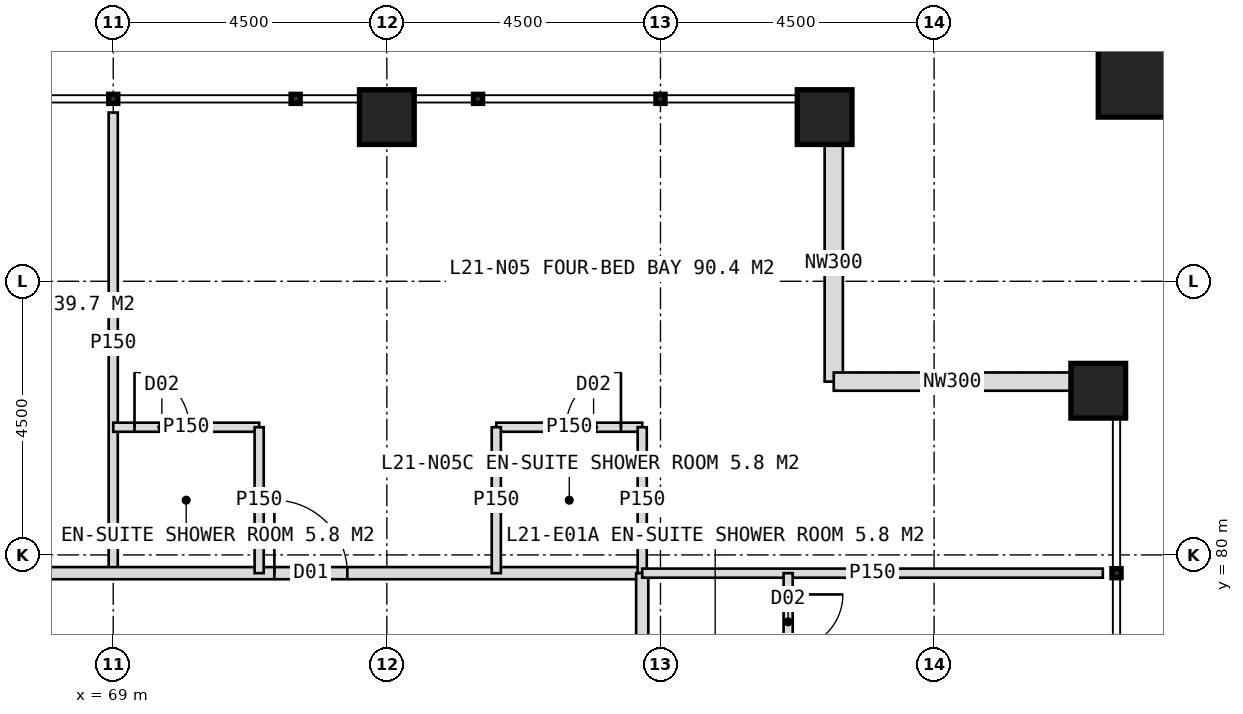
"""IFC4 building model, lengths in metres.
Left out: names, types, materials, properties, quantities, classifications, styles, units other than length and angle.
Written with IfcOpenShell. Run it as: python <this file> out.ifc"""

import sys

from ifc_helpers import new_model, si_unit, direction, frame, frame_2d, origin, origin_2d, place, context, subcontext, project, spatial, rectangle, hollow_rectangle, extrude, element, fill, save


model = new_model("IFC4")
c1 = context("Model", 3, precision=1e-05, world=origin(), true_north=direction((0.0, 1.0)))
c2 = subcontext(c1, "Body", "Model", "MODEL_VIEW")
j1 = project(units=[si_unit("LENGTHUNIT", "METRE"), si_unit("PLANEANGLEUNIT", "RADIAN")], contexts=[c1])
p1 = place(None, origin())
s1 = spatial("IfcSite", under=j1, at=p1, CompositionType="ELEMENT")
p2 = place(p1, origin())
s2 = spatial("IfcBuilding", under=s1, at=p2, CompositionType="ELEMENT")
p3 = place(p2, frame((0.0, 0.0, 91.0)))
s3 = spatial("IfcBuildingStorey", under=s2, at=p3, CompositionType="ELEMENT", Elevation=91.0)
for number, where, z_axis, x_axis in (
    (1, (73.5, 87.2, 0.0), (0.0, 0.0, 1.0), (1.0, 0.0, 0.0)),
    (2, (80.7, 87.2, 0.0), (0.0, 0.0, 1.0), (1.0, 0.0, 0.0)),
    (3, (85.2, 82.7, 0.0), (0.0, 0.0, 1.0), (1.0, 0.0, 0.0)),
):
    element("IfcColumn", number, at=place(p3, frame(where, z_axis=z_axis, x_axis=x_axis)), inside=s3, PredefinedType="COLUMN", context=c2, shape_type="SweptSolid", body=[
        extrude(hollow_rectangle(XDim=0.9, YDim=0.9, WallThickness=0.08, at=origin_2d()), origin(), (0.0, 0.0, 1.0), 4.0),
    ])
p4 = place(p3, frame((86.1, 88.1, 0.0), z_axis=(0.0, 0.0, 1.0), x_axis=(1.0, 0.0, 0.0)))
e4 = element("IfcColumn", 4, at=p4, inside=s3, PredefinedType="COLUMN", context=c2, shape_type="SweptSolid", body=[
    extrude(hollow_rectangle(XDim=1.8, YDim=1.8, WallThickness=0.1, at=origin_2d()), origin(), (0.0, 0.0, 1.0), 2.0),
])
for number, where, z_axis, x_axis in (
    (5, (80.85, 86.75, 0.0), (0.0, 0.0, 1.0), (0.0, -1.0, 0.0)),
    (6, (80.85, 82.85, 0.0), (0.0, 0.0, 1.0), (1.0, 0.0, 0.0)),
):
    element("IfcWall", number, at=place(p3, frame(where, z_axis=z_axis, x_axis=x_axis)), inside=s3, PredefinedType="ELEMENTEDWALL", context=c2, shape_type="SweptSolid", body=[
        extrude(rectangle(XDim=3.9, YDim=0.3, at=frame_2d((1.95, 0.0))), origin(), (0.0, 0.0, 1.0), 2.95),
    ])
p5 = place(p3, frame((69.0, 79.7, 0.0), z_axis=(0.0, 0.0, 1.0), x_axis=(0.0, 1.0, 0.0)))
e7 = element("IfcWall", 7, at=p5, inside=s3, PredefinedType="PARTITIONING", context=c2, shape_type="SweptSolid", body=[
    extrude(rectangle(XDim=7.575, YDim=0.15, at=frame_2d((3.788, 0.0))), origin(), (0.0, 0.0, 1.0), 3.75),
])
p6 = place(p3, frame((42.3, 79.7, 0.0), z_axis=(0.0, 0.0, 1.0), x_axis=(1.0, 0.0, 0.0)))
e8 = element("IfcWall", 8, at=p6, inside=s3, PredefinedType="PARTITIONING", context=c2, shape_type="SweptSolid", body=[
    extrude(rectangle(XDim=35.4, YDim=0.2, at=frame_2d((17.7, 0.0))), origin(), (0.0, 0.0, 1.0), 3.75),
])
p7 = place(p6, frame((2.65, 0.0, 0.0)))
e9 = element("IfcOpeningElement", 9, at=p7, cuts=e8, PredefinedType="OPENING", context=c2, shape_type="SweptSolid", body=[
    extrude(rectangle(XDim=1.2, YDim=2.2, at=frame_2d((0.6, 1.1))), frame((0.0, 0.11, 0.0), z_axis=(0.0, -1.0, 0.0), x_axis=(1.0, 0.0, 0.0)), (0.0, 0.0, 1.0), 0.22),
])
p8 = place(p6, frame((11.2, 0.0, 0.0)))
e10 = element("IfcOpeningElement", 10, at=p8, cuts=e8, PredefinedType="OPENING", context=c2, shape_type="SweptSolid", body=[
    extrude(rectangle(XDim=1.0, YDim=2.1, at=frame_2d((0.5, 1.05))), frame((0.0, 0.11, 0.0), z_axis=(0.0, -1.0, 0.0), x_axis=(1.0, 0.0, 0.0)), (0.0, 0.0, 1.0), 0.22),
])
p9 = place(p6, frame((17.2, 0.0, 0.0)))
e11 = element("IfcOpeningElement", 11, at=p9, cuts=e8, PredefinedType="OPENING", context=c2, shape_type="SweptSolid", body=[
    extrude(rectangle(XDim=1.0, YDim=2.1, at=frame_2d((0.5, 1.05))), frame((0.0, 0.11, 0.0), z_axis=(0.0, -1.0, 0.0), x_axis=(1.0, 0.0, 0.0)), (0.0, 0.0, 1.0), 0.22),
])
p10 = place(p6, frame((23.35, 0.0, 0.0)))
e12 = element("IfcOpeningElement", 12, at=p10, cuts=e8, PredefinedType="OPENING", context=c2, shape_type="SweptSolid", body=[
    extrude(rectangle(XDim=1.2, YDim=2.2, at=frame_2d((0.6, 1.1))), frame((0.0, 0.11, 0.0), z_axis=(0.0, -1.0, 0.0), x_axis=(1.0, 0.0, 0.0)), (0.0, 0.0, 1.0), 0.22),
])
p11 = place(p6, frame((29.35, 0.0, 0.0)))
e13 = element("IfcOpeningElement", 13, at=p11, cuts=e8, PredefinedType="OPENING", context=c2, shape_type="SweptSolid", body=[
    extrude(rectangle(XDim=1.2, YDim=2.2, at=frame_2d((0.6, 1.1))), frame((0.0, 0.11, 0.0), z_axis=(0.0, -1.0, 0.0), x_axis=(1.0, 0.0, 0.0)), (0.0, 0.0, 1.0), 0.22),
])
p12 = place(p3, frame((69.0, 82.1, 0.0), z_axis=(0.0, 0.0, 1.0), x_axis=(1.0, 0.0, 0.0)))
e14 = element("IfcWall", 14, at=p12, inside=s3, PredefinedType="PARTITIONING", context=c2, shape_type="SweptSolid", body=[
    extrude(rectangle(XDim=2.4, YDim=0.15, at=frame_2d((1.2, 0.0))), origin(), (0.0, 0.0, 1.0), 3.75),
])
p13 = place(p12, frame((0.35, 0.0, 0.0)))
e15 = element("IfcOpeningElement", 15, at=p13, cuts=e14, PredefinedType="OPENING", context=c2, shape_type="SweptSolid", body=[
    extrude(rectangle(XDim=0.9, YDim=2.1, at=frame_2d((0.45, 1.05))), frame((0.0, 0.085, 0.0), z_axis=(0.0, -1.0, 0.0), x_axis=(1.0, 0.0, 0.0)), (0.0, 0.0, 1.0), 0.17),
])
p14 = place(p3, frame((71.4, 79.7, 0.0), z_axis=(0.0, 0.0, 1.0), x_axis=(0.0, 1.0, 0.0)))
e16 = element("IfcWall", 16, at=p14, inside=s3, PredefinedType="PARTITIONING", context=c2, shape_type="SweptSolid", body=[
    extrude(rectangle(XDim=2.4, YDim=0.15, at=frame_2d((1.2, 0.0))), origin(), (0.0, 0.0, 1.0), 3.75),
])
p15 = place(p3, frame((75.3, 82.1, 0.0), z_axis=(0.0, 0.0, 1.0), x_axis=(1.0, 0.0, 0.0)))
e17 = element("IfcWall", 17, at=p15, inside=s3, PredefinedType="PARTITIONING", context=c2, shape_type="SweptSolid", body=[
    extrude(rectangle(XDim=2.4, YDim=0.15, at=frame_2d((1.2, 0.0))), origin(), (0.0, 0.0, 1.0), 3.75),
])
p16 = place(p15, frame((1.15, 0.0, 0.0)))
e18 = element("IfcOpeningElement", 18, at=p16, cuts=e17, PredefinedType="OPENING", context=c2, shape_type="SweptSolid", body=[
    extrude(rectangle(XDim=0.9, YDim=2.1, at=frame_2d((0.45, 1.05))), frame((0.0, 0.085, 0.0), z_axis=(0.0, -1.0, 0.0), x_axis=(1.0, 0.0, 0.0)), (0.0, 0.0, 1.0), 0.17),
])
for number, where, z_axis, x_axis in (
    (19, (75.3, 79.7, 0.0), (0.0, 0.0, 1.0), (0.0, 1.0, 0.0)),
    (20, (77.7, 79.7, 0.0), (0.0, 0.0, 1.0), (0.0, 1.0, 0.0)),
):
    element("IfcWall", number, at=place(p3, frame(where, z_axis=z_axis, x_axis=x_axis)), inside=s3, PredefinedType="PARTITIONING", context=c2, shape_type="SweptSolid", body=[
        extrude(rectangle(XDim=2.4, YDim=0.15, at=frame_2d((1.2, 0.0))), origin(), (0.0, 0.0, 1.0), 3.75),
    ])
p17 = place(p3, frame((77.7, 79.7, 0.0), z_axis=(0.0, 0.0, 1.0), x_axis=(0.0, -1.0, 0.0)))
e21 = element("IfcWall", 21, at=p17, inside=s3, PredefinedType="PARTITIONING", context=c2, shape_type="SweptSolid", body=[
    extrude(rectangle(XDim=35.4, YDim=0.2, at=frame_2d((17.7, 0.0))), origin(), (0.0, 0.0, 1.0), 3.75),
])
p18 = place(p17, frame((2.65, 0.0, 0.0)))
e22 = element("IfcOpeningElement", 22, at=p18, cuts=e21, PredefinedType="OPENING", context=c2, shape_type="SweptSolid", body=[
    extrude(rectangle(XDim=1.2, YDim=2.2, at=frame_2d((0.6, 1.1))), frame((0.0, 0.11, 0.0), z_axis=(0.0, -1.0, 0.0), x_axis=(1.0, 0.0, 0.0)), (0.0, 0.0, 1.0), 0.22),
])
p19 = place(p17, frame((8.35, 0.0, 0.0)))
e23 = element("IfcOpeningElement", 23, at=p19, cuts=e21, PredefinedType="OPENING", context=c2, shape_type="SweptSolid", body=[
    extrude(rectangle(XDim=1.2, YDim=2.2, at=frame_2d((0.6, 1.1))), frame((0.0, 0.11, 0.0), z_axis=(0.0, -1.0, 0.0), x_axis=(1.0, 0.0, 0.0)), (0.0, 0.0, 1.0), 0.22),
])
p20 = place(p17, frame((14.35, 0.0, 0.0)))
e24 = element("IfcOpeningElement", 24, at=p20, cuts=e21, PredefinedType="OPENING", context=c2, shape_type="SweptSolid", body=[
    extrude(rectangle(XDim=1.2, YDim=2.2, at=frame_2d((0.6, 1.1))), frame((0.0, 0.11, 0.0), z_axis=(0.0, -1.0, 0.0), x_axis=(1.0, 0.0, 0.0)), (0.0, 0.0, 1.0), 0.22),
])
p21 = place(p17, frame((20.35, 0.0, 0.0)))
e25 = element("IfcOpeningElement", 25, at=p21, cuts=e21, PredefinedType="OPENING", context=c2, shape_type="SweptSolid", body=[
    extrude(rectangle(XDim=1.2, YDim=2.2, at=frame_2d((0.6, 1.1))), frame((0.0, 0.11, 0.0), z_axis=(0.0, -1.0, 0.0), x_axis=(1.0, 0.0, 0.0)), (0.0, 0.0, 1.0), 0.22),
])
p22 = place(p17, frame((29.35, 0.0, 0.0)))
e26 = element("IfcOpeningElement", 26, at=p22, cuts=e21, PredefinedType="OPENING", context=c2, shape_type="SweptSolid", body=[
    extrude(rectangle(XDim=1.2, YDim=2.2, at=frame_2d((0.6, 1.1))), frame((0.0, 0.11, 0.0), z_axis=(0.0, -1.0, 0.0), x_axis=(1.0, 0.0, 0.0)), (0.0, 0.0, 1.0), 0.22),
])
p23 = place(p3, frame((77.7, 79.7, 0.0), z_axis=(0.0, 0.0, 1.0), x_axis=(1.0, 0.0, 0.0)))
e27 = element("IfcWall", 27, at=p23, inside=s3, PredefinedType="PARTITIONING", context=c2, shape_type="SweptSolid", body=[
    extrude(rectangle(XDim=7.575, YDim=0.15, at=frame_2d((3.788, 0.0))), origin(), (0.0, 0.0, 1.0), 3.75),
])
p24 = place(p3, frame((80.1, 79.7, 0.0), z_axis=(0.0, 0.0, 1.0), x_axis=(0.0, -1.0, 0.0)))
e28 = element("IfcWall", 28, at=p24, inside=s3, PredefinedType="PARTITIONING", context=c2, shape_type="SweptSolid", body=[
    extrude(rectangle(XDim=2.4, YDim=0.15, at=frame_2d((1.2, 0.0))), origin(), (0.0, 0.0, 1.0), 3.75),
])
p25 = place(p24, frame((0.35, 0.0, 0.0)))
e29 = element("IfcOpeningElement", 29, at=p25, cuts=e28, PredefinedType="OPENING", context=c2, shape_type="SweptSolid", body=[
    extrude(rectangle(XDim=0.9, YDim=2.1, at=frame_2d((0.45, 1.05))), frame((0.0, 0.085, 0.0), z_axis=(0.0, -1.0, 0.0), x_axis=(1.0, 0.0, 0.0)), (0.0, 0.0, 1.0), 0.17),
])
p26 = place(p11, origin())
e30 = element("IfcDoor", 30, at=p26, inside=s3, OperationType="SINGLE_SWING_LEFT", PredefinedType="DOOR", context=c2, shape_type="SweptSolid", body=[
    extrude(rectangle(XDim=1.2, YDim=2.2, at=frame_2d((0.6, 1.1))), frame((0.0, 0.025, 0.0), z_axis=(0.0, -1.0, 0.0), x_axis=(1.0, 0.0, 0.0)), (0.0, 0.0, 1.0), 0.05),
])
fill(e13, e30)
p27 = place(p13, origin())
e31 = element("IfcDoor", 31, at=p27, inside=s3, OperationType="SINGLE_SWING_LEFT", PredefinedType="DOOR", context=c2, shape_type="SweptSolid", body=[
    extrude(rectangle(XDim=0.9, YDim=2.1, at=frame_2d((0.45, 1.05))), frame((0.0, 0.025, 0.0), z_axis=(0.0, -1.0, 0.0), x_axis=(1.0, 0.0, 0.0)), (0.0, 0.0, 1.0), 0.05),
])
fill(e15, e31)
p28 = place(p16, origin())
e32 = element("IfcDoor", 32, at=p28, inside=s3, OperationType="SINGLE_SWING_RIGHT", PredefinedType="DOOR", context=c2, shape_type="SweptSolid", body=[
    extrude(rectangle(XDim=0.9, YDim=2.1, at=frame_2d((0.45, 1.05))), frame((0.0, 0.025, 0.0), z_axis=(0.0, -1.0, 0.0), x_axis=(1.0, 0.0, 0.0)), (0.0, 0.0, 1.0), 0.05),
])
fill(e18, e32)
p29 = place(p25, origin())
e33 = element("IfcDoor", 33, at=p29, inside=s3, OperationType="SINGLE_SWING_LEFT", PredefinedType="DOOR", context=c2, shape_type="SweptSolid", body=[
    extrude(rectangle(XDim=0.9, YDim=2.1, at=frame_2d((0.45, 1.05))), frame((0.0, 0.025, 0.0), z_axis=(0.0, -1.0, 0.0), x_axis=(1.0, 0.0, 0.0)), (0.0, 0.0, 1.0), 0.05),
])
fill(e29, e33)
save(model, sys.argv[1])
